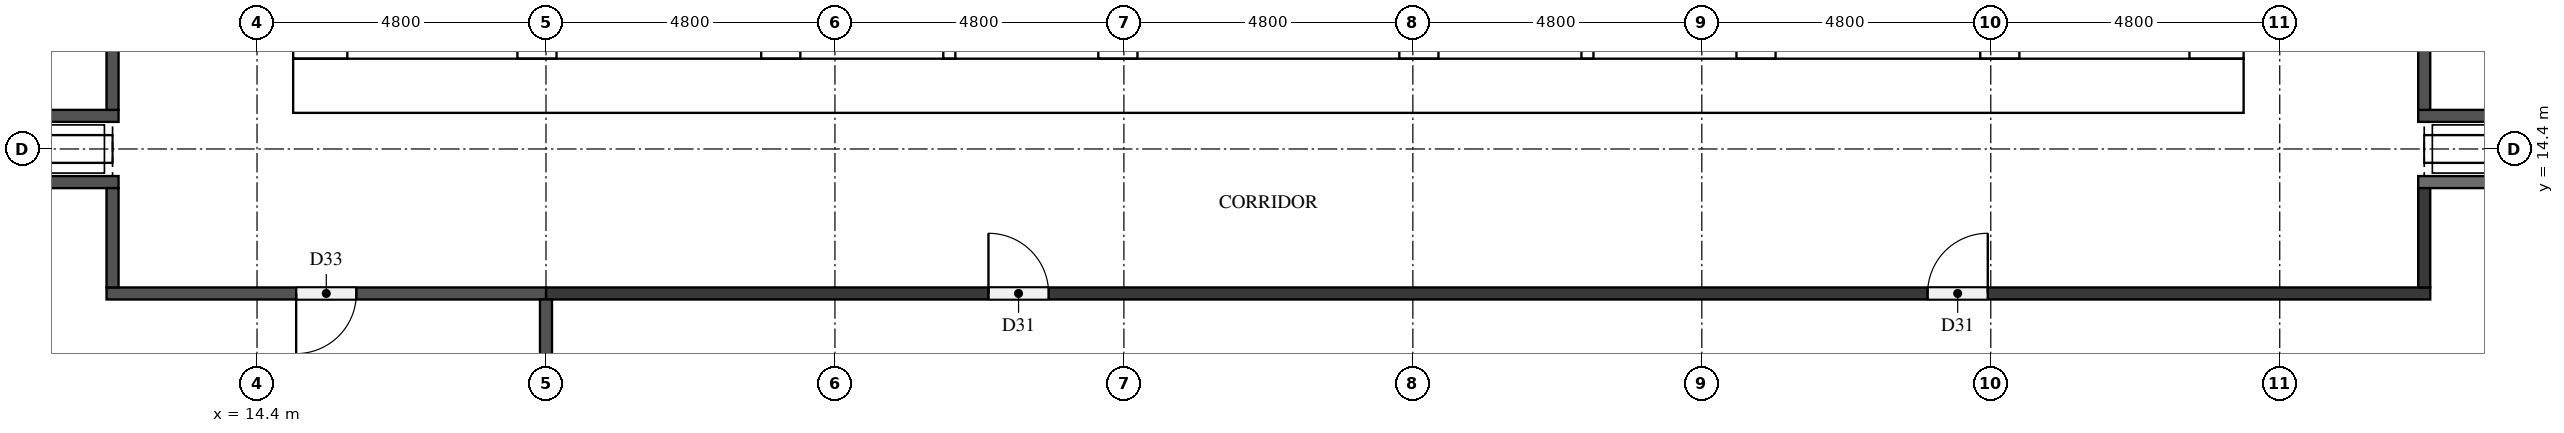
"""IFC4 building model, lengths in metres.
Left out: names, types, materials, properties, quantities, classifications, styles, units other than length and angle.
Written with IfcOpenShell. Run it as: python <this file> out.ifc"""

import sys

from ifc_helpers import new_model, si_unit, direction, frame, frame_2d, origin, place, context, subcontext, project, spatial, rectangle, extrude, element, fill, save


model = new_model("IFC4")
c1 = context("Model", 3, precision=1e-05, world=origin(), true_north=direction((0.0, 1.0)))
c2 = subcontext(c1, "Body", "Model", "MODEL_VIEW")
j1 = project(units=[si_unit("LENGTHUNIT", "METRE"), si_unit("PLANEANGLEUNIT", "RADIAN")], contexts=[c1])
p1 = place(None, origin())
s1 = spatial("IfcSite", under=j1, at=p1, CompositionType="ELEMENT")
p2 = place(p1, origin())
s2 = spatial("IfcBuilding", under=s1, at=p2, CompositionType="ELEMENT")
p3 = place(p2, frame((0.0, 0.0, 53.9)))
s3 = spatial("IfcBuildingStorey", under=s2, at=p3, CompositionType="ELEMENT", Elevation=53.9)
p4 = place(p3, frame((15.0, 15.45, 0.0), z_axis=(0.0, 0.0, 1.0), x_axis=(1.0, 0.0, 0.0)))
e1 = element("IfcWall", 1, at=p4, inside=s3, PredefinedType="SHEAR", context=c2, shape_type="SweptSolid", body=[
    extrude(rectangle(XDim=32.4, YDim=0.9, at=frame_2d((16.2, 0.0))), origin(), (0.0, 0.0, 1.0), 5.1),
])
p5 = place(p4, frame((15.3, 0.0, 0.0)))
e2 = element("IfcOpeningElement", 2, at=p5, cuts=e1, PredefinedType="OPENING", context=c2, shape_type="SweptSolid", body=[
    extrude(rectangle(XDim=1.8, YDim=2.1, at=frame_2d((0.9, 1.05))), frame((0.0, 0.46, 0.0), z_axis=(0.0, -1.0, 0.0), x_axis=(1.0, 0.0, 0.0)), (0.0, 0.0, 1.0), 0.92),
])
p6 = place(p3, frame((15.45, 15.9, 0.0), z_axis=(0.0, 0.0, 1.0), x_axis=(0.0, 1.0, 0.0)))
e3 = element("IfcWall", 3, at=p6, inside=s3, PredefinedType="SHEAR", context=c2, shape_type="SweptSolid", body=[
    extrude(rectangle(XDim=21.0, YDim=0.9, at=frame_2d((10.5, 0.0))), origin(), (0.0, 0.0, 1.0), 5.1),
])
p7 = place(p6, frame((4.86, 0.0, 0.0)))
e4 = element("IfcOpeningElement", 4, at=p7, cuts=e3, PredefinedType="OPENING", context=c2, shape_type="SweptSolid", body=[
    extrude(rectangle(XDim=1.2, YDim=2.1, at=frame_2d((0.6, 1.05))), frame((0.0, 0.46, 0.0), z_axis=(0.0, -1.0, 0.0), x_axis=(1.0, 0.0, 0.0)), (0.0, 0.0, 1.0), 0.92),
])
p8 = place(p3, frame((46.95, 15.9, 0.0), z_axis=(0.0, 0.0, 1.0), x_axis=(0.0, 1.0, 0.0)))
e5 = element("IfcWall", 5, at=p8, inside=s3, PredefinedType="SHEAR", context=c2, shape_type="SweptSolid", body=[
    extrude(rectangle(XDim=21.0, YDim=0.9, at=frame_2d((10.5, 0.0))), origin(), (0.0, 0.0, 1.0), 5.1),
])
p9 = place(p8, frame((10.2, 0.0, 0.0)))
e6 = element("IfcOpeningElement", 6, at=p9, cuts=e5, PredefinedType="OPENING", context=c2, shape_type="SweptSolid", body=[
    extrude(rectangle(XDim=1.2, YDim=2.1, at=frame_2d((0.6, 1.05))), frame((0.0, 0.46, 0.0), z_axis=(0.0, -1.0, 0.0), x_axis=(1.0, 0.0, 0.0)), (0.0, 0.0, 1.0), 0.92),
])
p10 = place(p3, frame((19.05, 15.9, 0.0), z_axis=(0.0, 0.0, 1.0), x_axis=(0.0, 1.0, 0.0)))
e7 = element("IfcWall", 7, at=p10, inside=s3, PredefinedType="SHEAR", context=c2, shape_type="SweptSolid", body=[
    extrude(rectangle(XDim=15.025, YDim=0.65, at=frame_2d((7.513, 0.0))), origin(), (0.0, 0.0, 1.0), 5.1),
])
p11 = place(p10, frame((9.55, 0.0, 0.0)))
e8 = element("IfcOpeningElement", 8, at=p11, cuts=e7, PredefinedType="OPENING", context=c2, shape_type="SweptSolid", body=[
    extrude(rectangle(XDim=1.1, YDim=2.1, at=frame_2d((0.55, 1.05))), frame((0.0, 0.335, 0.0), z_axis=(0.0, -1.0, 0.0), x_axis=(1.0, 0.0, 0.0)), (0.0, 0.0, 1.0), 0.67),
])
p12 = place(p10, frame((13.05, 0.0, 0.0)))
e9 = element("IfcOpeningElement", 9, at=p12, cuts=e7, PredefinedType="OPENING", context=c2, shape_type="SweptSolid", body=[
    extrude(rectangle(XDim=1.1, YDim=2.1, at=frame_2d((0.55, 1.05))), frame((0.0, 0.335, 0.0), z_axis=(0.0, -1.0, 0.0), x_axis=(1.0, 0.0, 0.0)), (0.0, 0.0, 1.0), 0.67),
])
p13 = place(p10, frame((0.3, 0.0, 0.0)))
e10 = element("IfcOpeningElement", 10, at=p13, cuts=e7, PredefinedType="OPENING", context=c2, shape_type="SweptSolid", body=[
    extrude(rectangle(XDim=1.2, YDim=2.1, at=frame_2d((0.6, 1.05))), frame((0.0, 0.335, 0.0), z_axis=(0.0, -1.0, 0.0), x_axis=(1.0, 0.0, 0.0)), (0.0, 0.0, 1.0), 0.67),
])
p14 = place(p3, frame((23.1, 15.9, 0.0), z_axis=(0.0, 0.0, 1.0), x_axis=(0.0, 1.0, 0.0)))
e11 = element("IfcWall", 11, at=p14, inside=s3, PredefinedType="SHEAR", context=c2, shape_type="SweptSolid", body=[
    extrude(rectangle(XDim=21.0, YDim=0.65, at=frame_2d((10.5, 0.0))), origin(), (0.0, 0.0, 1.0), 5.1),
])
p15 = place(p3, frame((39.3, 15.9, 0.0), z_axis=(0.0, 0.0, 1.0), x_axis=(0.0, 1.0, 0.0)))
e12 = element("IfcWall", 12, at=p15, inside=s3, PredefinedType="SHEAR", context=c2, shape_type="SweptSolid", body=[
    extrude(rectangle(XDim=8.35, YDim=0.65, at=frame_2d((4.175, 0.0))), origin(), (0.0, 0.0, 1.0), 5.1),
])
p16 = place(p3, frame((43.35, 15.9, 0.0), z_axis=(0.0, 0.0, 1.0), x_axis=(0.0, 1.0, 0.0)))
e13 = element("IfcWall", 13, at=p16, inside=s3, PredefinedType="SHEAR", context=c2, shape_type="SweptSolid", body=[
    extrude(rectangle(XDim=8.35, YDim=0.65, at=frame_2d((4.175, 0.0))), origin(), (0.0, 0.0, 1.0), 5.1),
])
p17 = place(p16, frame((0.3, 0.0, 0.0)))
e14 = element("IfcOpeningElement", 14, at=p17, cuts=e13, PredefinedType="OPENING", context=c2, shape_type="SweptSolid", body=[
    extrude(rectangle(XDim=1.2, YDim=2.1, at=frame_2d((0.6, 1.05))), frame((0.0, 0.335, 0.0), z_axis=(0.0, -1.0, 0.0), x_axis=(1.0, 0.0, 0.0)), (0.0, 0.0, 1.0), 0.67),
])
for number, where, z_axis, x_axis in (
    (15, (28.7, 15.9, 0.0), (0.0, 0.0, 1.0), (0.0, 1.0, 0.0)),
    (16, (33.7, 15.9, 0.0), (0.0, 0.0, 1.0), (0.0, 1.0, 0.0)),
):
    element("IfcWall", number, at=place(p3, frame(where, z_axis=z_axis, x_axis=x_axis)), inside=s3, PredefinedType="SHEAR", context=c2, shape_type="SweptSolid", body=[
        extrude(rectangle(XDim=2.525, YDim=0.65, at=frame_2d((1.263, 0.0))), origin(), (0.0, 0.0, 1.0), 5.1),
    ])
for number, where, z_axis, x_axis in (
    (17, (25.9, 15.9, 0.0), (0.0, 0.0, 1.0), (0.0, 1.0, 0.0)),
    (18, (36.5, 15.9, 0.0), (0.0, 0.0, 1.0), (0.0, 1.0, 0.0)),
):
    element("IfcWall", number, at=place(p3, frame(where, z_axis=z_axis, x_axis=x_axis)), inside=s3, PredefinedType="SOLIDWALL", context=c2, shape_type="SweptSolid", body=[
        extrude(rectangle(XDim=2.525, YDim=0.2, at=frame_2d((1.263, 0.0))), origin(), (0.0, 0.0, 1.0), 5.1),
    ])
p18 = place(p3, frame((19.2, 12.0, 0.0), z_axis=(0.0, 0.0, 1.0), x_axis=(1.0, 0.0, 0.0)))
e19 = element("IfcWall", 19, at=p18, inside=s3, PredefinedType="PARTITIONING", context=c2, shape_type="SweptSolid", body=[
    extrude(rectangle(XDim=31.3, YDim=0.2, at=frame_2d((15.65, 0.0))), origin(), (0.0, 0.0, 1.0), 5.1),
])
p19 = place(p18, frame((22.95, 0.0, 0.0)))
e20 = element("IfcOpeningElement", 20, at=p19, cuts=e19, PredefinedType="OPENING", context=c2, shape_type="SweptSolid", body=[
    extrude(rectangle(XDim=1.0, YDim=2.1, at=frame_2d((0.5, 1.05))), frame((0.0, 0.11, 0.0), z_axis=(0.0, -1.0, 0.0), x_axis=(1.0, 0.0, 0.0)), (0.0, 0.0, 1.0), 0.22),
])
p20 = place(p18, frame((7.35, 0.0, 0.0)))
e21 = element("IfcOpeningElement", 21, at=p20, cuts=e19, PredefinedType="OPENING", context=c2, shape_type="SweptSolid", body=[
    extrude(rectangle(XDim=1.0, YDim=2.1, at=frame_2d((0.5, 1.05))), frame((0.0, 0.11, 0.0), z_axis=(0.0, -1.0, 0.0), x_axis=(1.0, 0.0, 0.0)), (0.0, 0.0, 1.0), 0.22),
])
p21 = place(p3, frame((19.2, 12.0, 0.0), z_axis=(0.0, 0.0, 1.0), x_axis=(-1.0, 0.0, 0.0)))
e22 = element("IfcWall", 22, at=p21, inside=s3, PredefinedType="PARTITIONING", context=c2, shape_type="SweptSolid", body=[
    extrude(rectangle(XDim=7.3, YDim=0.2, at=frame_2d((3.65, 0.0))), origin(), (0.0, 0.0, 1.0), 5.1),
])
p22 = place(p21, frame((3.15, 0.0, 0.0)))
e23 = element("IfcOpeningElement", 23, at=p22, cuts=e22, PredefinedType="OPENING", context=c2, shape_type="SweptSolid", body=[
    extrude(rectangle(XDim=1.0, YDim=2.1, at=frame_2d((0.5, 1.05))), frame((0.0, 0.11, 0.0), z_axis=(0.0, -1.0, 0.0), x_axis=(1.0, 0.0, 0.0)), (0.0, 0.0, 1.0), 0.22),
])
p23 = place(p3, frame((50.3, 13.85, 0.0), z_axis=(0.0, 0.0, 1.0), x_axis=(1.0, 0.0, 0.0)))
e24 = element("IfcWall", 24, at=p23, inside=s3, PredefinedType="PARTITIONING", context=c2, shape_type="SweptSolid", body=[
    extrude(rectangle(XDim=9.8, YDim=0.2, at=frame_2d((4.9, 0.0))), origin(), (0.0, 0.0, 1.0), 5.1),
])
for number, where, z_axis, x_axis in (
    (25, (7.1, 13.85, 0.0), (0.0, 0.0, 1.0), (1.0, 0.0, 0.0)),
    (26, (7.1, 14.95, 0.0), (0.0, 0.0, 1.0), (1.0, 0.0, 0.0)),
):
    element("IfcWall", number, at=place(p3, frame(where, z_axis=z_axis, x_axis=x_axis)), inside=s3, PredefinedType="PARTITIONING", context=c2, shape_type="SweptSolid", body=[
        extrude(rectangle(XDim=5.0, YDim=0.2, at=frame_2d((2.5, 0.0))), origin(), (0.0, 0.0, 1.0), 5.1),
    ])
p24 = place(p3, frame((50.3, 14.95, 0.0), z_axis=(0.0, 0.0, 1.0), x_axis=(1.0, 0.0, 0.0)))
e27 = element("IfcWall", 27, at=p24, inside=s3, PredefinedType="PARTITIONING", context=c2, shape_type="SweptSolid", body=[
    extrude(rectangle(XDim=9.8, YDim=0.2, at=frame_2d((4.9, 0.0))), origin(), (0.0, 0.0, 1.0), 5.1),
])
p25 = place(p3, frame((12.0, 12.1, 0.0), z_axis=(0.0, 0.0, 1.0), x_axis=(0.0, 1.0, 0.0)))
e28 = element("IfcWall", 28, at=p25, inside=s3, PredefinedType="PARTITIONING", context=c2, shape_type="SweptSolid", body=[
    extrude(rectangle(XDim=1.65, YDim=0.2, at=frame_2d((0.825, 0.0))), origin(), (0.0, 0.0, 1.0), 5.1),
])
p26 = place(p3, frame((12.0, 15.05, 0.0), z_axis=(0.0, 0.0, 1.0), x_axis=(0.0, 1.0, 0.0)))
e29 = element("IfcWall", 29, at=p26, inside=s3, PredefinedType="PARTITIONING", context=c2, shape_type="SweptSolid", body=[
    extrude(rectangle(XDim=8.3, YDim=0.2, at=frame_2d((4.15, 0.0))), origin(), (0.0, 0.0, 1.0), 5.1),
])
p27 = place(p26, frame((3.65, 0.0, 0.0)))
e30 = element("IfcOpeningElement", 30, at=p27, cuts=e29, PredefinedType="OPENING", context=c2, shape_type="SweptSolid", body=[
    extrude(rectangle(XDim=1.0, YDim=2.1, at=frame_2d((0.5, 1.05))), frame((0.0, 0.11, 0.0), z_axis=(0.0, -1.0, 0.0), x_axis=(1.0, 0.0, 0.0)), (0.0, 0.0, 1.0), 0.22),
])
p28 = place(p3, frame((19.2, 2.3, 0.0), z_axis=(0.0, 0.0, 1.0), x_axis=(0.0, 1.0, 0.0)))
e31 = element("IfcWall", 31, at=p28, inside=s3, PredefinedType="PARTITIONING", context=c2, shape_type="SweptSolid", body=[
    extrude(rectangle(XDim=9.6, YDim=0.2, at=frame_2d((4.8, 0.0))), origin(), (0.0, 0.0, 1.0), 5.1),
])
p29 = place(p3, frame((50.4, 12.1, 0.0), z_axis=(0.0, 0.0, 1.0), x_axis=(0.0, 1.0, 0.0)))
e32 = element("IfcWall", 32, at=p29, inside=s3, PredefinedType="PARTITIONING", context=c2, shape_type="SweptSolid", body=[
    extrude(rectangle(XDim=1.65, YDim=0.2, at=frame_2d((0.825, 0.0))), origin(), (0.0, 0.0, 1.0), 5.1),
])
p30 = place(p3, frame((50.4, 23.35, 0.0), z_axis=(0.0, 0.0, 1.0), x_axis=(0.0, -1.0, 0.0)))
e33 = element("IfcWall", 33, at=p30, inside=s3, PredefinedType="PARTITIONING", context=c2, shape_type="SweptSolid", body=[
    extrude(rectangle(XDim=8.3, YDim=0.2, at=frame_2d((4.15, 0.0))), origin(), (0.0, 0.0, 1.0), 5.1),
])
p31 = place(p30, frame((3.65, 0.0, 0.0)))
e34 = element("IfcOpeningElement", 34, at=p31, cuts=e33, PredefinedType="OPENING", context=c2, shape_type="SweptSolid", body=[
    extrude(rectangle(XDim=1.0, YDim=2.1, at=frame_2d((0.5, 1.05))), frame((0.0, 0.11, 0.0), z_axis=(0.0, -1.0, 0.0), x_axis=(1.0, 0.0, 0.0)), (0.0, 0.0, 1.0), 0.22),
])
p32 = place(p5, frame((1.8, 0.0, 0.0), z_axis=(0.0, 0.0, 1.0), x_axis=(-1.0, 0.0, 0.0)))
e35 = element("IfcDoor", 35, at=p32, inside=s3, OperationType="DOUBLE_DOOR_SINGLE_SWING", PredefinedType="DOOR", context=c2, shape_type="SweptSolid", body=[
    extrude(rectangle(XDim=1.8, YDim=2.1, at=frame_2d((0.9, 1.05))), frame((0.0, 0.025, 0.0), z_axis=(0.0, -1.0, 0.0), x_axis=(1.0, 0.0, 0.0)), (0.0, 0.0, 1.0), 0.05),
])
fill(e2, e35)
p33 = place(p22, origin())
e36 = element("IfcDoor", 36, at=p33, inside=s3, OperationType="SINGLE_SWING_RIGHT", PredefinedType="DOOR", context=c2, shape_type="SweptSolid", body=[
    extrude(rectangle(XDim=1.0, YDim=2.1, at=frame_2d((0.5, 1.05))), frame((0.0, 0.025, 0.0), z_axis=(0.0, -1.0, 0.0), x_axis=(1.0, 0.0, 0.0)), (0.0, 0.0, 1.0), 0.05),
])
fill(e23, e36)
p34 = place(p19, origin())
e37 = element("IfcDoor", 37, at=p34, inside=s3, OperationType="SINGLE_SWING_RIGHT", PredefinedType="DOOR", context=c2, shape_type="SweptSolid", body=[
    extrude(rectangle(XDim=1.0, YDim=2.1, at=frame_2d((0.5, 1.05))), frame((0.0, 0.025, 0.0), z_axis=(0.0, -1.0, 0.0), x_axis=(1.0, 0.0, 0.0)), (0.0, 0.0, 1.0), 0.05),
])
fill(e20, e37)
p35 = place(p20, origin())
e38 = element("IfcDoor", 38, at=p35, inside=s3, OperationType="SINGLE_SWING_LEFT", PredefinedType="DOOR", context=c2, shape_type="SweptSolid", body=[
    extrude(rectangle(XDim=1.0, YDim=2.1, at=frame_2d((0.5, 1.05))), frame((0.0, 0.025, 0.0), z_axis=(0.0, -1.0, 0.0), x_axis=(1.0, 0.0, 0.0)), (0.0, 0.0, 1.0), 0.05),
])
fill(e21, e38)
save(model, sys.argv[1])
